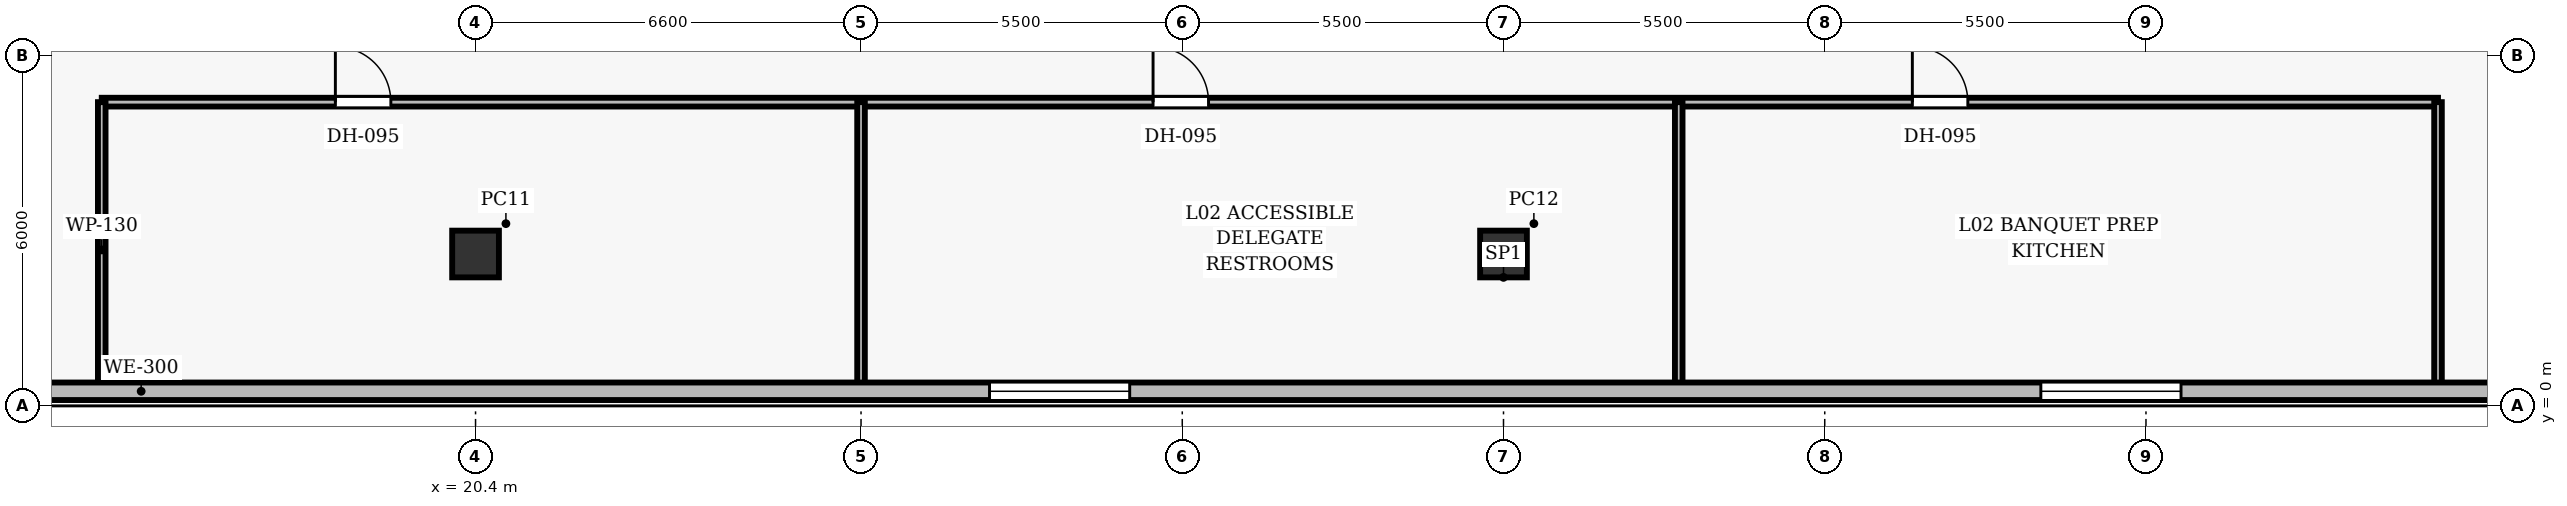
"""IFC4 building model, lengths in metres.
Left out: names, types, materials, properties, quantities, classifications, styles, units other than length and angle.
Written with IfcOpenShell. Run it as: python <this file> out.ifc"""

import sys

from ifc_helpers import new_model, si_unit, direction, frame, frame_2d, origin, origin_2d, place, context, subcontext, project, spatial, rectangle, extrude, element, fill, save


model = new_model("IFC4")
c1 = context("Model", 3, precision=1e-05, world=origin(), true_north=direction((0.0, 1.0)))
c2 = subcontext(c1, "Body", "Model", "MODEL_VIEW")
j1 = project(units=[si_unit("LENGTHUNIT", "METRE"), si_unit("PLANEANGLEUNIT", "RADIAN")], contexts=[c1])
p1 = place(None, origin())
s1 = spatial("IfcSite", under=j1, at=p1, CompositionType="ELEMENT")
p2 = place(p1, origin())
s2 = spatial("IfcBuilding", under=s1, at=p2, CompositionType="ELEMENT")
p3 = place(p2, frame((0.0, 0.0, 12.0)))
s3 = spatial("IfcBuildingStorey", under=s2, at=p3, CompositionType="ELEMENT", Elevation=12.0)
for number, where, z_axis, x_axis in (
    (1, (20.4, 2.6, 0.0), (0.0, 0.0, 1.0), (1.0, 0.0, 0.0)),
    (2, (38.0, 2.6, 0.0), (0.0, 0.0, 1.0), (1.0, 0.0, 0.0)),
):
    element("IfcColumn", number, at=place(p3, frame(where, z_axis=z_axis, x_axis=x_axis)), inside=s3, PredefinedType="COLUMN", context=c2, shape_type="SweptSolid", body=[
        extrude(rectangle(XDim=0.8, YDim=0.8, at=origin_2d()), origin(), (0.0, 0.0, 1.0), 6.6),
    ])
p4 = place(p3, frame((14.0, 5.2, 0.0), z_axis=(0.0, 0.0, 1.0), x_axis=(1.0, 0.0, 0.0)))
e3 = element("IfcWall", 3, at=p4, inside=s3, PredefinedType="PARTITIONING", context=c2, shape_type="SweptSolid", body=[
    extrude(rectangle(XDim=40.0, YDim=0.15, at=frame_2d((20.0, 0.0))), origin(), (0.0, 0.0, 1.0), 5.31),
])
p5 = place(p4, frame((4.0, 0.0, 0.0)))
e4 = element("IfcOpeningElement", 4, at=p5, cuts=e3, PredefinedType="OPENING", context=c2, shape_type="SweptSolid", body=[
    extrude(rectangle(XDim=0.95, YDim=2.15, at=frame_2d((0.475, 1.075))), frame((0.0, 0.085, 0.0), z_axis=(0.0, -1.0, 0.0), x_axis=(1.0, 0.0, 0.0)), (0.0, 0.0, 1.0), 0.17),
])
p6 = place(p4, frame((18.0, 0.0, 0.0)))
e5 = element("IfcOpeningElement", 5, at=p6, cuts=e3, PredefinedType="OPENING", context=c2, shape_type="SweptSolid", body=[
    extrude(rectangle(XDim=0.95, YDim=2.15, at=frame_2d((0.475, 1.075))), frame((0.0, 0.085, 0.0), z_axis=(0.0, -1.0, 0.0), x_axis=(1.0, 0.0, 0.0)), (0.0, 0.0, 1.0), 0.17),
])
p7 = place(p4, frame((31.0, 0.0, 0.0)))
e6 = element("IfcOpeningElement", 6, at=p7, cuts=e3, PredefinedType="OPENING", context=c2, shape_type="SweptSolid", body=[
    extrude(rectangle(XDim=0.95, YDim=2.15, at=frame_2d((0.475, 1.075))), frame((0.0, 0.085, 0.0), z_axis=(0.0, -1.0, 0.0), x_axis=(1.0, 0.0, 0.0)), (0.0, 0.0, 1.0), 0.17),
])
for number, where, z_axis, x_axis in (
    (7, (14.0, 0.14, 0.0), (0.0, 0.0, 1.0), (0.0, 1.0, 0.0)),
    (8, (27.0, 0.14, 0.0), (0.0, 0.0, 1.0), (0.0, 1.0, 0.0)),
    (9, (41.0, 0.14, 0.0), (0.0, 0.0, 1.0), (0.0, 1.0, 0.0)),
    (10, (54.0, 0.14, 0.0), (0.0, 0.0, 1.0), (0.0, 1.0, 0.0)),
):
    element("IfcWall", number, at=place(p3, frame(where, z_axis=z_axis, x_axis=x_axis)), inside=s3, PredefinedType="PARTITIONING", context=c2, shape_type="SweptSolid", body=[
        extrude(rectangle(XDim=5.06, YDim=0.13, at=frame_2d((2.53, 0.0))), origin(), (0.0, 0.0, 1.0), 5.31),
    ])
p8 = place(p3, frame((75.6, 0.25, 0.0), z_axis=(0.0, 0.0, 1.0), x_axis=(-1.0, 0.0, 0.0)))
e11 = element("IfcWall", 11, at=p8, inside=s3, PredefinedType="SOLIDWALL", context=c2, shape_type="SweptSolid", body=[
    extrude(rectangle(XDim=75.2, YDim=0.3, at=frame_2d((37.6, 0.0))), origin(), (0.0, 0.0, 1.0), 5.76),
])
p9 = place(p8, frame((10.0, 0.0, 0.95)))
e12 = element("IfcOpeningElement", 12, at=p9, cuts=e11, PredefinedType="OPENING", context=c2, shape_type="SweptSolid", body=[
    extrude(rectangle(XDim=2.4, YDim=2.0, at=frame_2d((1.2, 1.0))), frame((0.0, 0.16, 0.0), z_axis=(0.0, -1.0, 0.0), x_axis=(1.0, 0.0, 0.0)), (0.0, 0.0, 1.0), 0.32),
])
p10 = place(p8, frame((18.0, 0.0, 0.95)))
e13 = element("IfcOpeningElement", 13, at=p10, cuts=e11, PredefinedType="OPENING", context=c2, shape_type="SweptSolid", body=[
    extrude(rectangle(XDim=2.4, YDim=2.0, at=frame_2d((1.2, 1.0))), frame((0.0, 0.16, 0.0), z_axis=(0.0, -1.0, 0.0), x_axis=(1.0, 0.0, 0.0)), (0.0, 0.0, 1.0), 0.32),
])
p11 = place(p8, frame((26.0, 0.0, 0.95)))
e14 = element("IfcOpeningElement", 14, at=p11, cuts=e11, PredefinedType="OPENING", context=c2, shape_type="SweptSolid", body=[
    extrude(rectangle(XDim=2.4, YDim=2.0, at=frame_2d((1.2, 1.0))), frame((0.0, 0.16, 0.0), z_axis=(0.0, -1.0, 0.0), x_axis=(1.0, 0.0, 0.0)), (0.0, 0.0, 1.0), 0.32),
])
p12 = place(p8, frame((44.0, 0.0, 0.95)))
e15 = element("IfcOpeningElement", 15, at=p12, cuts=e11, PredefinedType="OPENING", context=c2, shape_type="SweptSolid", body=[
    extrude(rectangle(XDim=2.4, YDim=2.0, at=frame_2d((1.2, 1.0))), frame((0.0, 0.16, 0.0), z_axis=(0.0, -1.0, 0.0), x_axis=(1.0, 0.0, 0.0)), (0.0, 0.0, 1.0), 0.32),
])
p13 = place(p5, origin())
e16 = element("IfcDoor", 16, at=p13, inside=s3, OperationType="SINGLE_SWING_LEFT", PredefinedType="DOOR", context=c2, shape_type="SweptSolid", body=[
    extrude(rectangle(XDim=0.95, YDim=2.15, at=frame_2d((0.475, 1.075))), frame((0.0, 0.025, 0.0), z_axis=(0.0, -1.0, 0.0), x_axis=(1.0, 0.0, 0.0)), (0.0, 0.0, 1.0), 0.05),
])
fill(e4, e16)
p14 = place(p6, origin())
e17 = element("IfcDoor", 17, at=p14, inside=s3, OperationType="SINGLE_SWING_LEFT", PredefinedType="DOOR", context=c2, shape_type="SweptSolid", body=[
    extrude(rectangle(XDim=0.95, YDim=2.15, at=frame_2d((0.475, 1.075))), frame((0.0, 0.025, 0.0), z_axis=(0.0, -1.0, 0.0), x_axis=(1.0, 0.0, 0.0)), (0.0, 0.0, 1.0), 0.05),
])
fill(e5, e17)
p15 = place(p7, origin())
e18 = element("IfcDoor", 18, at=p15, inside=s3, OperationType="SINGLE_SWING_LEFT", PredefinedType="DOOR", context=c2, shape_type="SweptSolid", body=[
    extrude(rectangle(XDim=0.95, YDim=2.15, at=frame_2d((0.475, 1.075))), frame((0.0, 0.025, 0.0), z_axis=(0.0, -1.0, 0.0), x_axis=(1.0, 0.0, 0.0)), (0.0, 0.0, 1.0), 0.05),
])
fill(e6, e18)
p16 = place(p11, origin())
e19 = element("IfcWindow", 19, at=p16, inside=s3, PartitioningType="SINGLE_PANEL", PredefinedType="WINDOW", context=c2, shape_type="SweptSolid", body=[
    extrude(rectangle(XDim=2.4, YDim=2.0, at=frame_2d((1.2, 1.0))), frame((0.0, 0.03, 0.0), z_axis=(0.0, -1.0, 0.0), x_axis=(1.0, 0.0, 0.0)), (0.0, 0.0, 1.0), 0.06),
])
fill(e14, e19)
p17 = place(p12, origin())
e20 = element("IfcWindow", 20, at=p17, inside=s3, PartitioningType="SINGLE_PANEL", PredefinedType="WINDOW", context=c2, shape_type="SweptSolid", body=[
    extrude(rectangle(XDim=2.4, YDim=2.0, at=frame_2d((1.2, 1.0))), frame((0.0, 0.03, 0.0), z_axis=(0.0, -1.0, 0.0), x_axis=(1.0, 0.0, 0.0)), (0.0, 0.0, 1.0), 0.06),
])
fill(e15, e20)
save(model, sys.argv[1])
